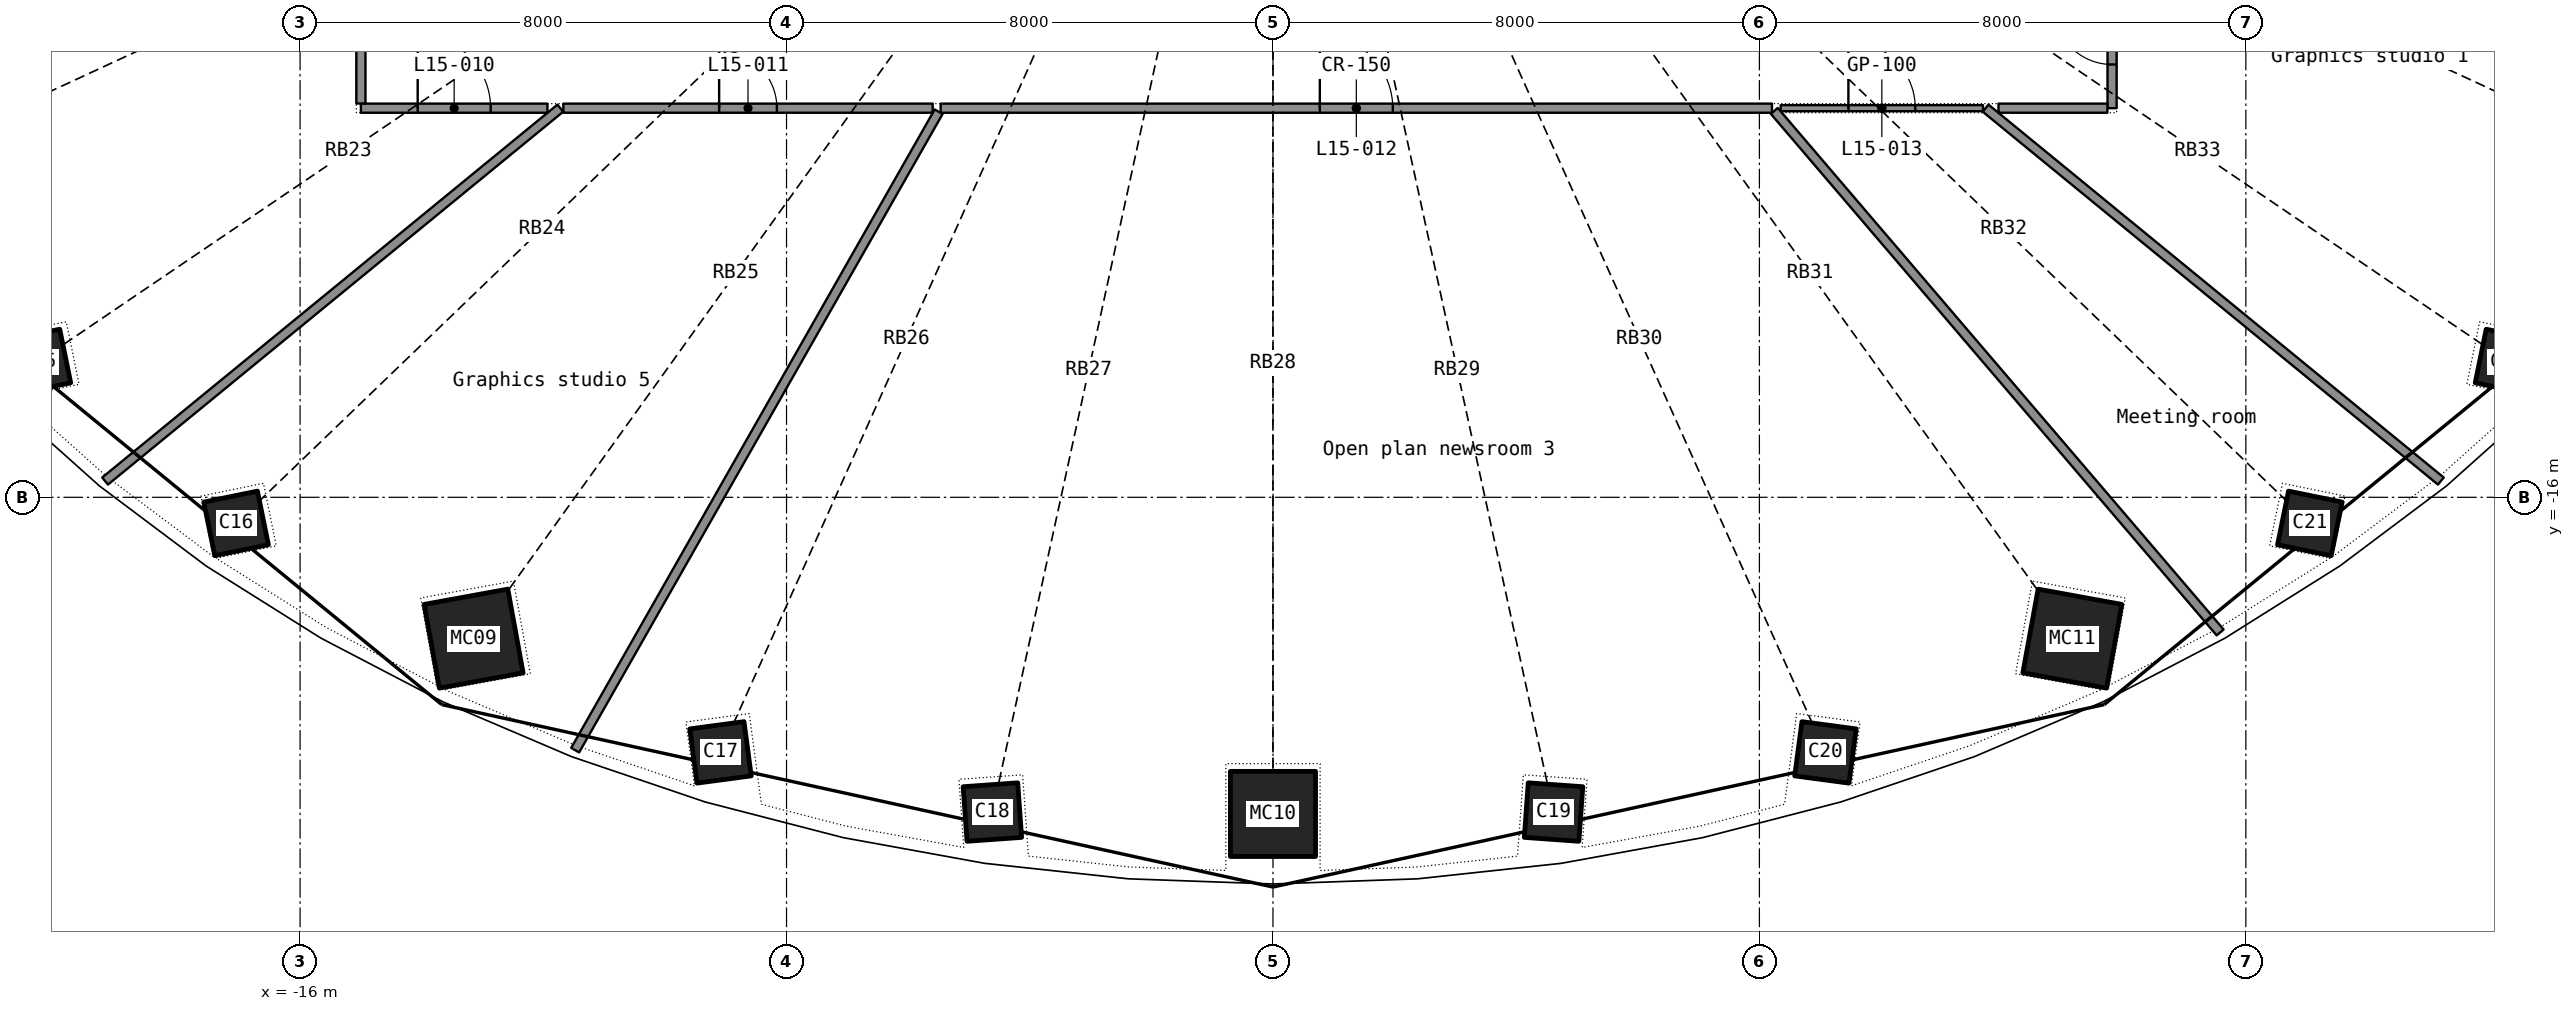
"""IFC4 building model, lengths in metres.
Left out: names, types, materials, properties, quantities, classifications, styles, units other than length and angle.
Written with IfcOpenShell. Run it as: python <this file> out.ifc"""

import sys

from ifc_helpers import new_model, si_unit, direction, frame, frame_2d, origin, origin_2d, place, context, subcontext, project, spatial, rectangle, hollow_rectangle, extrude, element, fill, save


model = new_model("IFC4")
c1 = context("Model", 3, precision=1e-05, world=origin(), true_north=direction((0.0, 1.0)))
c2 = subcontext(c1, "Body", "Model", "MODEL_VIEW")
j1 = project(units=[si_unit("LENGTHUNIT", "METRE"), si_unit("PLANEANGLEUNIT", "RADIAN")], contexts=[c1])
p1 = place(None, origin())
s1 = spatial("IfcSite", under=j1, at=p1, CompositionType="ELEMENT")
p2 = place(p1, origin())
s2 = spatial("IfcBuilding", under=s1, at=p2, CompositionType="ELEMENT")
p3 = place(p2, frame((0.0, 0.0, 66.7)))
s3 = spatial("IfcBuildingStorey", under=s2, at=p3, CompositionType="ELEMENT", Elevation=66.7)
p4 = place(p3, frame((-20.303, -13.767, 0.0), z_axis=(0.026512179, 0.018202391, 0.999482755), x_axis=(-0.719547914, 0.694412935, 0.006440138)))
e1 = element("IfcColumn", 1, at=p4, inside=s3, PredefinedType="COLUMN", context=c2, shape_type="SweptSolid", body=[
    extrude(hollow_rectangle(XDim=0.9, YDim=0.9, WallThickness=0.025, at=origin_2d()), origin(), (0.0, 0.0, 1.0), 3.702),
])
p5 = place(p3, frame((-17.052, -16.429, 0.0), z_axis=(0.022226156, 0.021698532, 0.999517469), x_axis=(-0.82776399, 0.561041886, 0.006227231)))
e2 = element("IfcColumn", 2, at=p5, inside=s3, PredefinedType="COLUMN", context=c2, shape_type="SweptSolid", body=[
    extrude(hollow_rectangle(XDim=0.9, YDim=0.9, WallThickness=0.025, at=origin_2d()), origin(), (0.0, 0.0, 1.0), 3.702),
])
p6 = place(p3, frame((-13.146, -18.324, 0.0), z_axis=(0.017280237, 0.024535299, 0.999549605), x_axis=(-0.907657106, 0.419677884, 0.005390036)))
e3 = element("IfcColumn", 3, at=p6, inside=s3, PredefinedType="COLUMN", context=c2, shape_type="SweptSolid", body=[
    extrude(hollow_rectangle(XDim=1.4, YDim=1.4, WallThickness=0.04, at=origin_2d()), origin(), (0.0, 0.0, 1.0), 3.702),
])
for number, where, z_axis, x_axis in (
    (4, (-9.086, -20.196, 0.0), (0.012, 0.027, 1.0), (-0.959, 0.282, 0.004)),
    (5, (-4.615, -21.177, 0.0), (0.006, 0.028, 1.0), (-0.99, 0.14, 0.002)),
):
    element("IfcColumn", number, at=place(p3, frame(where, z_axis=z_axis, x_axis=x_axis)), inside=s3, PredefinedType="COLUMN", context=c2, shape_type="SweptSolid", body=[
        extrude(hollow_rectangle(XDim=0.9, YDim=0.9, WallThickness=0.025, at=origin_2d()), origin(), (0.0, 0.0, 1.0), 3.701),
    ])
p7 = place(p3, frame((0.0, -21.208, 0.0), z_axis=(0.0, 0.02836206, 0.999597716), x_axis=(-1.0, 0.0, 0.0)))
e6 = element("IfcColumn", 6, at=p7, inside=s3, PredefinedType="COLUMN", context=c2, shape_type="SweptSolid", body=[
    extrude(hollow_rectangle(XDim=1.4, YDim=1.4, WallThickness=0.04, at=origin_2d()), origin(), (0.0, 0.0, 1.0), 3.701),
])
for number, where, z_axis, x_axis in (
    (7, (4.615, -21.177, 0.0), (-0.006, 0.028, 1.0), (-0.99, -0.14, -0.002)),
    (8, (9.086, -20.196, 0.0), (-0.012, 0.027, 1.0), (-0.959, -0.282, -0.004)),
):
    element("IfcColumn", number, at=place(p3, frame(where, z_axis=z_axis, x_axis=x_axis)), inside=s3, PredefinedType="COLUMN", context=c2, shape_type="SweptSolid", body=[
        extrude(hollow_rectangle(XDim=0.9, YDim=0.9, WallThickness=0.025, at=origin_2d()), origin(), (0.0, 0.0, 1.0), 3.701),
    ])
p8 = place(p3, frame((13.146, -18.324, 0.0), z_axis=(-0.017280237, 0.024535299, 0.999549605), x_axis=(-0.907657106, -0.419677884, -0.005390036)))
e9 = element("IfcColumn", 9, at=p8, inside=s3, PredefinedType="COLUMN", context=c2, shape_type="SweptSolid", body=[
    extrude(hollow_rectangle(XDim=1.4, YDim=1.4, WallThickness=0.04, at=origin_2d()), origin(), (0.0, 0.0, 1.0), 3.702),
])
p9 = place(p3, frame((17.052, -16.429, 0.0), z_axis=(-0.022226156, 0.021698532, 0.999517469), x_axis=(-0.82776399, -0.561041886, -0.006227231)))
e10 = element("IfcColumn", 10, at=p9, inside=s3, PredefinedType="COLUMN", context=c2, shape_type="SweptSolid", body=[
    extrude(hollow_rectangle(XDim=0.9, YDim=0.9, WallThickness=0.025, at=origin_2d()), origin(), (0.0, 0.0, 1.0), 3.702),
])
p10 = place(p3, frame((20.303, -13.767, 0.0), z_axis=(-0.026512179, 0.018202391, 0.999482755), x_axis=(-0.719547914, -0.694412935, -0.006440138)))
e11 = element("IfcColumn", 11, at=p10, inside=s3, PredefinedType="COLUMN", context=c2, shape_type="SweptSolid", body=[
    extrude(hollow_rectangle(XDim=0.9, YDim=0.9, WallThickness=0.025, at=origin_2d()), origin(), (0.0, 0.0, 1.0), 3.702),
])
p11 = place(p3, frame((-5.465, -9.6, 0.0), z_axis=(0.0, 0.0, 1.0), x_axis=(1.0, 0.0, 0.0)))
e12 = element("IfcWall", 12, at=p11, inside=s3, PredefinedType="PARTITIONING", context=c2, shape_type="SweptSolid", body=[
    extrude(rectangle(XDim=13.672, YDim=0.15, at=frame_2d((6.836, 0.0))), origin(), (0.0, 0.0, 1.0), 2.4),
])
p12 = place(p11, frame((6.236, 0.0, 0.0)))
e13 = element("IfcOpeningElement", 13, at=p12, cuts=e12, PredefinedType="OPENING", context=c2, shape_type="SweptSolid", body=[
    extrude(rectangle(XDim=1.2, YDim=2.2, at=frame_2d((0.6, 1.1))), frame((0.0, 0.085, 0.0), z_axis=(0.0, -1.0, 0.0), x_axis=(1.0, 0.0, 0.0)), (0.0, 0.0, 1.0), 0.17),
])
p13 = place(p3, frame((-11.476, -20.159, 0.0), z_axis=(0.0, 0.0, 1.0), x_axis=(0.494734776, 0.869044016, 0.0)))
e14 = element("IfcWall", 14, at=p13, inside=s3, PredefinedType="PARTITIONING", context=c2, shape_type="SweptSolid", body=[
    extrude(rectangle(XDim=12.083, YDim=0.15, at=frame_2d((6.042, 0.0))), origin(), (0.0, 0.0, 1.0), 2.4),
])
p14 = place(p3, frame((15.577, -18.223, 0.0), z_axis=(0.0, 0.0, 1.0), x_axis=(-0.649782359, 0.76012031, 0.0)))
e15 = element("IfcWall", 15, at=p14, inside=s3, PredefinedType="PARTITIONING", context=c2, shape_type="SweptSolid", body=[
    extrude(rectangle(XDim=11.285, YDim=0.15, at=frame_2d((5.642, 0.0))), origin(), (0.0, 0.0, 1.0), 2.4),
])
for number, where, z_axis, x_axis in (
    (16, (-19.207, -15.733, 0.0), (0.0, 0.0, 1.0), (0.774, 0.634, 0.0)),
    (17, (11.72, -9.6, 0.0), (0.0, 0.0, 1.0), (0.774, -0.634, 0.0)),
):
    element("IfcWall", number, at=place(p3, frame(where, z_axis=z_axis, x_axis=x_axis)), inside=s3, PredefinedType="PARTITIONING", context=c2, shape_type="SweptSolid", body=[
        extrude(rectangle(XDim=9.678, YDim=0.15, at=frame_2d((4.839, 0.0))), origin(), (0.0, 0.0, 1.0), 2.4),
    ])
p15 = place(p3, frame((-11.671, -9.6, 0.0), z_axis=(0.0, 0.0, 1.0), x_axis=(1.0, 0.0, 0.0)))
e18 = element("IfcWall", 18, at=p15, inside=s3, PredefinedType="PARTITIONING", context=c2, shape_type="SweptSolid", body=[
    extrude(rectangle(XDim=6.074, YDim=0.15, at=frame_2d((3.037, 0.0))), origin(), (0.0, 0.0, 1.0), 2.4),
])
p16 = place(p15, frame((2.562, 0.0, 0.0)))
e19 = element("IfcOpeningElement", 19, at=p16, cuts=e18, PredefinedType="OPENING", context=c2, shape_type="SweptSolid", body=[
    extrude(rectangle(XDim=0.95, YDim=2.15, at=frame_2d((0.475, 1.075))), frame((0.0, 0.085, 0.0), z_axis=(0.0, -1.0, 0.0), x_axis=(1.0, 0.0, 0.0)), (0.0, 0.0, 1.0), 0.17),
])
p17 = place(p3, frame((8.35, -9.6, 0.0), z_axis=(0.0, 0.0, 1.0), x_axis=(1.0, 0.0, 0.0)))
e20 = element("IfcWall", 20, at=p17, inside=s3, PredefinedType="PARTITIONING", context=c2, shape_type="SweptSolid", body=[
    extrude(rectangle(XDim=3.327, YDim=0.1, at=frame_2d((1.664, 0.0))), origin(), (0.0, 0.0, 1.0), 2.4),
])
p18 = place(p17, frame((1.114, 0.0, 0.0)))
e21 = element("IfcOpeningElement", 21, at=p18, cuts=e20, PredefinedType="OPENING", context=c2, shape_type="SweptSolid", body=[
    extrude(rectangle(XDim=1.1, YDim=2.2, at=frame_2d((0.55, 1.1))), frame((0.0, 0.06, 0.0), z_axis=(0.0, -1.0, 0.0), x_axis=(1.0, 0.0, 0.0)), (0.0, 0.0, 1.0), 0.12),
])
p19 = place(p3, frame((-15.0, -9.6, 0.0), z_axis=(0.0, 0.0, 1.0), x_axis=(1.0, 0.0, 0.0)))
e22 = element("IfcWall", 22, at=p19, inside=s3, PredefinedType="PARTITIONING", context=c2, shape_type="SweptSolid", body=[
    extrude(rectangle(XDim=3.068, YDim=0.15, at=frame_2d((1.534, 0.0))), origin(), (0.0, 0.0, 1.0), 2.4),
])
p20 = place(p19, frame((0.934, 0.0, 0.0)))
e23 = element("IfcOpeningElement", 23, at=p20, cuts=e22, PredefinedType="OPENING", context=c2, shape_type="SweptSolid", body=[
    extrude(rectangle(XDim=1.2, YDim=2.2, at=frame_2d((0.6, 1.1))), frame((0.0, 0.085, 0.0), z_axis=(0.0, -1.0, 0.0), x_axis=(1.0, 0.0, 0.0)), (0.0, 0.0, 1.0), 0.17),
])
p21 = place(p3, frame((-15.0, -7.213, 0.0), z_axis=(0.0, 0.0, 1.0), x_axis=(0.0, -1.0, 0.0)))
e24 = element("IfcWall", 24, at=p21, inside=s3, PredefinedType="PARTITIONING", context=c2, shape_type="SweptSolid", body=[
    extrude(rectangle(XDim=2.31, YDim=0.15, at=frame_2d((1.155, 0.0))), origin(), (0.0, 0.0, 1.0), 2.4),
])
p22 = place(p3, frame((13.8, -9.6, 0.0), z_axis=(0.0, 0.0, 1.0), x_axis=(0.0, 1.0, 0.0)))
e25 = element("IfcWall", 25, at=p22, inside=s3, PredefinedType="PARTITIONING", context=c2, shape_type="SweptSolid", body=[
    extrude(rectangle(XDim=2.387, YDim=0.15, at=frame_2d((1.194, 0.0))), origin(), (0.0, 0.0, 1.0), 2.4),
])
p23 = place(p22, frame((0.719, 0.0, 0.0)))
e26 = element("IfcOpeningElement", 26, at=p23, cuts=e25, PredefinedType="OPENING", context=c2, shape_type="SweptSolid", body=[
    extrude(rectangle(XDim=0.95, YDim=2.15, at=frame_2d((0.475, 1.075))), frame((0.0, 0.085, 0.0), z_axis=(0.0, -1.0, 0.0), x_axis=(1.0, 0.0, 0.0)), (0.0, 0.0, 1.0), 0.17),
])
p24 = place(p3, frame((11.932, -9.6, 0.0), z_axis=(0.0, 0.0, 1.0), x_axis=(1.0, 0.0, 0.0)))
e27 = element("IfcWall", 27, at=p24, inside=s3, PredefinedType="PARTITIONING", context=c2, shape_type="SweptSolid", body=[
    extrude(rectangle(XDim=1.791, YDim=0.15, at=frame_2d((0.896, 0.0))), origin(), (0.0, 0.0, 1.0), 2.4),
])
p25 = place(p23, origin())
e28 = element("IfcDoor", 28, at=p25, inside=s3, OperationType="SINGLE_SWING_RIGHT", PredefinedType="DOOR", context=c2, shape_type="SweptSolid", body=[
    extrude(rectangle(XDim=0.95, YDim=2.15, at=frame_2d((0.475, 1.075))), frame((0.0, 0.025, 0.0), z_axis=(0.0, -1.0, 0.0), x_axis=(1.0, 0.0, 0.0)), (0.0, 0.0, 1.0), 0.05),
])
fill(e26, e28)
p26 = place(p20, origin())
e29 = element("IfcDoor", 29, at=p26, inside=s3, OperationType="DOUBLE_DOOR_SINGLE_SWING", PredefinedType="DOOR", context=c2, shape_type="SweptSolid", body=[
    extrude(rectangle(XDim=1.2, YDim=2.2, at=frame_2d((0.6, 1.1))), frame((0.0, 0.025, 0.0), z_axis=(0.0, -1.0, 0.0), x_axis=(1.0, 0.0, 0.0)), (0.0, 0.0, 1.0), 0.05),
])
fill(e23, e29)
p27 = place(p16, origin())
e30 = element("IfcDoor", 30, at=p27, inside=s3, OperationType="SINGLE_SWING_LEFT", PredefinedType="DOOR", context=c2, shape_type="SweptSolid", body=[
    extrude(rectangle(XDim=0.95, YDim=2.15, at=frame_2d((0.475, 1.075))), frame((0.0, 0.025, 0.0), z_axis=(0.0, -1.0, 0.0), x_axis=(1.0, 0.0, 0.0)), (0.0, 0.0, 1.0), 0.05),
])
fill(e19, e30)
p28 = place(p12, origin())
e31 = element("IfcDoor", 31, at=p28, inside=s3, OperationType="DOUBLE_DOOR_SINGLE_SWING", PredefinedType="DOOR", context=c2, shape_type="SweptSolid", body=[
    extrude(rectangle(XDim=1.2, YDim=2.2, at=frame_2d((0.6, 1.1))), frame((0.0, 0.025, 0.0), z_axis=(0.0, -1.0, 0.0), x_axis=(1.0, 0.0, 0.0)), (0.0, 0.0, 1.0), 0.05),
])
fill(e13, e31)
p29 = place(p18, origin())
e32 = element("IfcDoor", 32, at=p29, inside=s3, OperationType="SINGLE_SWING_LEFT", PredefinedType="DOOR", context=c2, shape_type="SweptSolid", body=[
    extrude(rectangle(XDim=1.1, YDim=2.2, at=frame_2d((0.55, 1.1))), frame((0.0, 0.025, 0.0), z_axis=(0.0, -1.0, 0.0), x_axis=(1.0, 0.0, 0.0)), (0.0, 0.0, 1.0), 0.05),
])
fill(e21, e32)
save(model, sys.argv[1])
